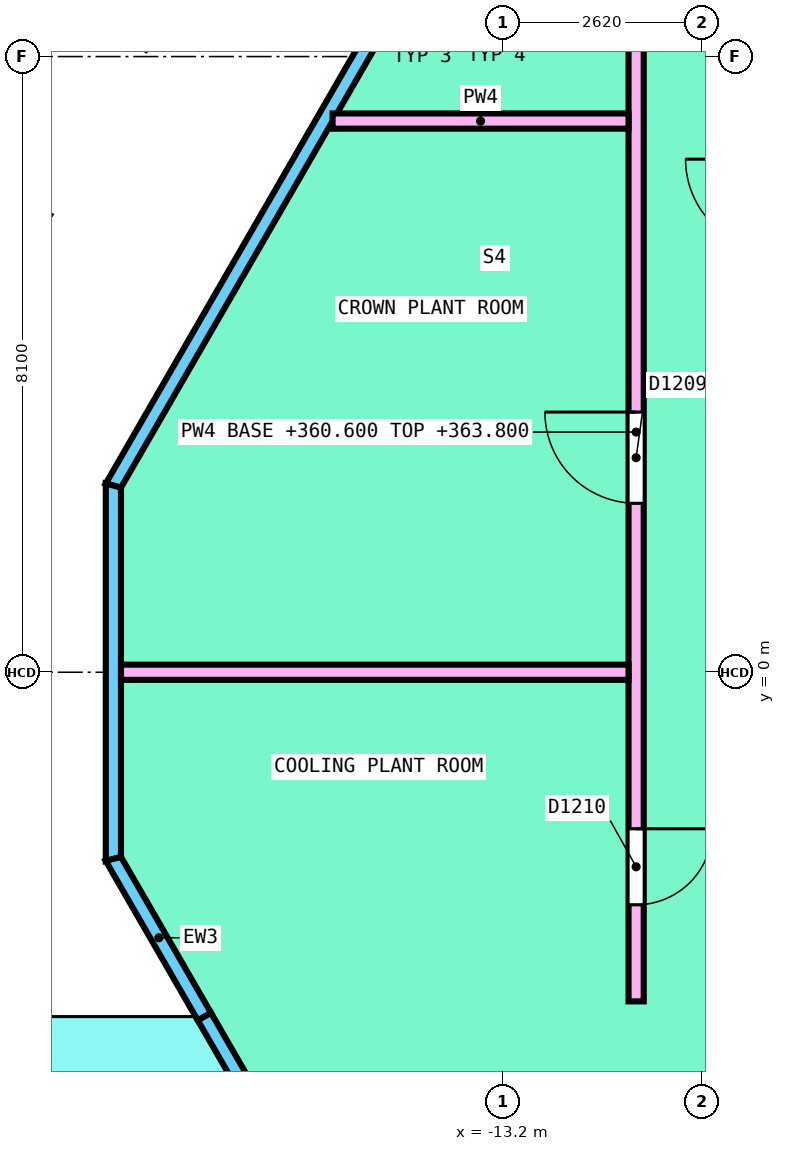
"""IFC4 building model, lengths in metres.
Left out: names, types, materials, properties, quantities, classifications, styles, units other than length and angle.
Written with IfcOpenShell. Run it as: python <this file> out.ifc"""

import sys

from ifc_helpers import new_model, si_unit, direction, frame, frame_2d, origin, place, context, subcontext, project, spatial, polyline, rectangle, outline, extrude, element, fill, save


model = new_model("IFC4")
c1 = context("Model", 3, precision=1e-05, world=origin(), true_north=direction((0.0, 1.0)))
c2 = subcontext(c1, "Body", "Model", "MODEL_VIEW")
j1 = project(units=[si_unit("LENGTHUNIT", "METRE"), si_unit("PLANEANGLEUNIT", "RADIAN")], contexts=[c1])
p1 = place(None, origin())
s1 = spatial("IfcSite", under=j1, at=p1, CompositionType="ELEMENT")
p2 = place(p1, origin())
s2 = spatial("IfcBuilding", under=s1, at=p2, CompositionType="ELEMENT")
p3 = place(p2, frame((0.0, 0.0, 360.6)))
s3 = spatial("IfcBuildingStorey", under=s2, at=p3, CompositionType="ELEMENT", Elevation=360.6)
p4 = place(p3, frame((-11.291, 14.644, 0.0), z_axis=(0.0, 0.0, 1.0), x_axis=(-0.499991740577, -0.866030172312, 0.0)))
e1 = element("IfcWall", 1, at=p4, inside=s3, PredefinedType="SOLIDWALL", context=c2, shape_type="SweptSolid", body=[
    extrude(outline(polyline([(-0.027, -0.1), (14.101, -0.1), (14.047, 0.1), (0.027, 0.1), (-0.027, -0.1)])), origin(), (0.0, 0.0, 1.0), 3.8),
])
p5 = place(p3, frame((-18.327, 2.456, 0.0), z_axis=(0.0, 0.0, 1.0), x_axis=(0.0, -1.0, 0.0)))
e2 = element("IfcWall", 2, at=p5, inside=s3, PredefinedType="SOLIDWALL", context=c2, shape_type="SweptSolid", body=[
    extrude(outline(polyline([(-0.027, -0.1), (4.938, -0.1), (4.885, 0.1), (0.027, 0.1), (-0.027, -0.1)])), origin(), (0.0, 0.0, 1.0), 3.8),
])
p6 = place(p3, frame((-18.327, -2.456, 0.0), z_axis=(0.0, 0.0, 1.0), x_axis=(0.499943030081, -0.866058292884, 0.0)))
e3 = element("IfcWall", 3, at=p6, inside=s3, PredefinedType="SOLIDWALL", context=c2, shape_type="SweptSolid", body=[
    extrude(outline(polyline([(-0.027, -0.1), (2.395, -0.1), (2.395, 0.1), (0.027, 0.1), (-0.027, -0.1)])), origin(), (0.0, 0.0, 1.0), 3.8),
])
p7 = place(p3, frame((-17.13, -4.53, 0.0), z_axis=(0.0, 0.0, 1.0), x_axis=(0.500027802648, -0.866009351323, 0.0)))
e4 = element("IfcWall", 4, at=p7, inside=s3, PredefinedType="SOLIDWALL", context=c2, shape_type="SweptSolid", body=[
    extrude(outline(polyline([(0.0, 0.0), (3.876, 0.0), (3.875, 0.03), (0.0, 4.0), (0.0, 0.0)])), frame((0.0, 0.1, 0.0), z_axis=(0.0, -1.0, 0.0), x_axis=(1.0, 0.0, 0.0)), (0.0, 0.0, 1.0), 0.2),
])
p8 = place(p3, frame((-11.45, -4.33, 0.0), z_axis=(0.0, 0.0, 1.0), x_axis=(0.0, 1.0, 0.0)))
e5 = element("IfcWall", 5, at=p8, inside=s3, PredefinedType="PARTITIONING", context=c2, shape_type="SweptSolid", body=[
    extrude(rectangle(XDim=14.98, YDim=0.2, at=frame_2d((7.49, 0.0))), origin(), (0.0, 0.0, 1.0), 3.2),
])
p9 = place(p8, frame((12.971, 0.0, 0.0)))
e6 = element("IfcOpeningElement", 6, at=p9, cuts=e5, PredefinedType="OPENING", context=c2, shape_type="SweptSolid", body=[
    extrude(rectangle(XDim=1.0, YDim=2.1, at=frame_2d((0.5, 1.05))), frame((0.0, 0.11, 0.0), z_axis=(0.0, -1.0, 0.0), x_axis=(1.0, 0.0, 0.0)), (0.0, 0.0, 1.0), 0.22),
])
p10 = place(p8, frame((6.553, 0.0, 0.0)))
e7 = element("IfcOpeningElement", 7, at=p10, cuts=e5, PredefinedType="OPENING", context=c2, shape_type="SweptSolid", body=[
    extrude(rectangle(XDim=1.2, YDim=2.1, at=frame_2d((0.6, 1.05))), frame((0.0, 0.11, 0.0), z_axis=(0.0, -1.0, 0.0), x_axis=(1.0, 0.0, 0.0)), (0.0, 0.0, 1.0), 0.22),
])
p11 = place(p8, frame((1.271, 0.0, 0.0)))
e8 = element("IfcOpeningElement", 8, at=p11, cuts=e5, PredefinedType="OPENING", context=c2, shape_type="SweptSolid", body=[
    extrude(rectangle(XDim=1.0, YDim=2.1, at=frame_2d((0.5, 1.05))), frame((0.0, 0.11, 0.0), z_axis=(0.0, -1.0, 0.0), x_axis=(1.0, 0.0, 0.0)), (0.0, 0.0, 1.0), 0.22),
])
p12 = place(p3, frame((-18.228, 0.0, 0.0), z_axis=(0.0, 0.0, 1.0), x_axis=(1.0, 0.0, 0.0)))
e9 = element("IfcWall", 9, at=p12, inside=s3, PredefinedType="PARTITIONING", context=c2, shape_type="SweptSolid", body=[
    extrude(rectangle(XDim=6.677, YDim=0.2, at=frame_2d((3.339, 0.0))), origin(), (0.0, 0.0, 1.0), 3.3),
])
p13 = place(p3, frame((-15.443, 7.251, 0.0), z_axis=(0.0, 0.0, 1.0), x_axis=(1.0, 0.0, 0.0)))
e10 = element("IfcWall", 10, at=p13, inside=s3, PredefinedType="PARTITIONING", context=c2, shape_type="SweptSolid", body=[
    extrude(rectangle(XDim=3.893, YDim=0.2, at=frame_2d((1.947, 0.0))), origin(), (0.0, 0.0, 1.0), 3.3),
])
p14 = place(p10, origin())
e11 = element("IfcDoor", 11, at=p14, inside=s3, OperationType="DOUBLE_DOOR_SINGLE_SWING", PredefinedType="DOOR", context=c2, shape_type="SweptSolid", body=[
    extrude(rectangle(XDim=1.2, YDim=2.1, at=frame_2d((0.6, 1.05))), frame((0.0, 0.025, 0.0), z_axis=(0.0, -1.0, 0.0), x_axis=(1.0, 0.0, 0.0)), (0.0, 0.0, 1.0), 0.05),
])
fill(e7, e11)
p15 = place(p11, origin())
e12 = element("IfcDoor", 12, at=p15, inside=s3, OperationType="SINGLE_SWING_LEFT", PredefinedType="DOOR", context=c2, shape_type="SweptSolid", body=[
    extrude(rectangle(XDim=1.0, YDim=2.1, at=frame_2d((0.5, 1.05))), frame((0.0, 0.025, 0.0), z_axis=(0.0, -1.0, 0.0), x_axis=(1.0, 0.0, 0.0)), (0.0, 0.0, 1.0), 0.05),
])
fill(e8, e12)
save(model, sys.argv[1])
